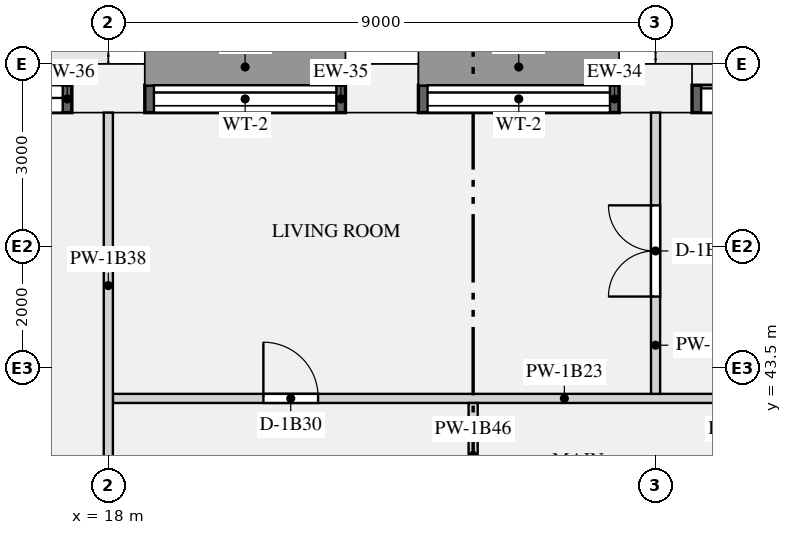
"""IFC4 building model, lengths in metres.
Left out: names, types, materials, properties, quantities, classifications, styles, units other than length and angle.
Written with IfcOpenShell. Run it as: python <this file> out.ifc"""

import sys

from ifc_helpers import new_model, si_unit, direction, frame, frame_2d, origin, origin_2d, place, context, subcontext, project, spatial, rectangle, extrude, element, fill, save


model = new_model("IFC4")
c1 = context("Model", 3, precision=1e-05, world=origin(), true_north=direction((0.0, 1.0)))
c2 = subcontext(c1, "Body", "Model", "MODEL_VIEW")
j1 = project(units=[si_unit("LENGTHUNIT", "METRE"), si_unit("PLANEANGLEUNIT", "RADIAN")], contexts=[c1])
p1 = place(None, origin())
s1 = spatial("IfcSite", under=j1, at=p1, CompositionType="ELEMENT")
p2 = place(p1, origin())
s2 = spatial("IfcBuilding", under=s1, at=p2, CompositionType="ELEMENT")
p3 = place(p2, frame((0.0, 0.0, 28.95)))
s3 = spatial("IfcBuildingStorey", under=s2, at=p3, CompositionType="ELEMENT", Elevation=28.95)
for number, where, z_axis, x_axis in (
    (1, (27.0, 48.1, 0.0), (0.0, 0.0, 1.0), (-1.0, 0.0, 0.0)),
    (2, (22.5, 48.1, 0.0), (0.0, 0.0, 1.0), (-1.0, 0.0, 0.0)),
    (3, (18.0, 48.1, 0.0), (0.0, 0.0, 1.0), (-1.0, 0.0, 0.0)),
):
    element("IfcColumn", number, at=place(p3, frame(where, z_axis=z_axis, x_axis=x_axis)), inside=s3, PredefinedType="USERDEFINED", context=c2, shape_type="SweptSolid", body=[
        extrude(rectangle(XDim=1.2, YDim=0.8, at=origin_2d()), origin(), (0.0, 0.0, 1.0), 3.15),
    ])
p4 = place(p3, frame((30.9, 47.925, 0.0), z_axis=(0.0, 0.0, 1.0), x_axis=(-1.0, 0.0, 0.0)))
e4 = element("IfcWall", 4, at=p4, inside=s3, PredefinedType="SOLIDWALL", context=c2, shape_type="SweptSolid", body=[
    extrude(rectangle(XDim=3.3, YDim=0.45, at=frame_2d((1.65, 0.0))), origin(), (0.0, 0.0, 1.0), 2.83),
])
p5 = place(p4, frame((0.15, 0.0, 0.0)))
e5 = element("IfcOpeningElement", 5, at=p5, cuts=e4, PredefinedType="OPENING", context=c2, shape_type="SweptSolid", body=[
    extrude(rectangle(XDim=3.0, YDim=2.3, at=frame_2d((1.5, 1.15))), frame((0.0, 0.235, 0.0), z_axis=(0.0, -1.0, 0.0), x_axis=(1.0, 0.0, 0.0)), (0.0, 0.0, 1.0), 0.47),
])
p6 = place(p3, frame((26.4, 47.925, 0.9), z_axis=(0.0, 0.0, 1.0), x_axis=(-1.0, 0.0, 0.0)))
e6 = element("IfcWall", 6, at=p6, inside=s3, PredefinedType="SOLIDWALL", context=c2, shape_type="SweptSolid", body=[
    extrude(rectangle(XDim=3.3, YDim=0.45, at=frame_2d((1.65, 0.0))), origin(), (0.0, 0.0, 1.0), 1.93),
])
p7 = place(p6, frame((0.15, 0.0, 0.15)))
e7 = element("IfcOpeningElement", 7, at=p7, cuts=e6, PredefinedType="OPENING", context=c2, shape_type="SweptSolid", body=[
    extrude(rectangle(XDim=3.0, YDim=1.5, at=frame_2d((1.5, 0.75))), frame((0.0, 0.235, 0.0), z_axis=(0.0, -1.0, 0.0), x_axis=(1.0, 0.0, 0.0)), (0.0, 0.0, 1.0), 0.47),
])
p8 = place(p3, frame((21.9, 47.925, 0.9), z_axis=(0.0, 0.0, 1.0), x_axis=(-1.0, 0.0, 0.0)))
e8 = element("IfcWall", 8, at=p8, inside=s3, PredefinedType="SOLIDWALL", context=c2, shape_type="SweptSolid", body=[
    extrude(rectangle(XDim=3.3, YDim=0.45, at=frame_2d((1.65, 0.0))), origin(), (0.0, 0.0, 1.0), 1.93),
])
p9 = place(p8, frame((0.15, 0.0, 0.15)))
e9 = element("IfcOpeningElement", 9, at=p9, cuts=e8, PredefinedType="OPENING", context=c2, shape_type="SweptSolid", body=[
    extrude(rectangle(XDim=3.0, YDim=1.5, at=frame_2d((1.5, 0.75))), frame((0.0, 0.235, 0.0), z_axis=(0.0, -1.0, 0.0), x_axis=(1.0, 0.0, 0.0)), (0.0, 0.0, 1.0), 0.47),
])
p10 = place(p3, frame((17.4, 47.925, 0.0), z_axis=(0.0, 0.0, 1.0), x_axis=(-1.0, 0.0, 0.0)))
e10 = element("IfcWall", 10, at=p10, inside=s3, PredefinedType="SOLIDWALL", context=c2, shape_type="SweptSolid", body=[
    extrude(rectangle(XDim=3.3, YDim=0.45, at=frame_2d((1.65, 0.0))), origin(), (0.0, 0.0, 1.0), 2.83),
])
p11 = place(p10, frame((0.15, 0.0, 0.0)))
e11 = element("IfcOpeningElement", 11, at=p11, cuts=e10, PredefinedType="OPENING", context=c2, shape_type="SweptSolid", body=[
    extrude(rectangle(XDim=3.0, YDim=2.3, at=frame_2d((1.5, 1.15))), frame((0.0, 0.235, 0.0), z_axis=(0.0, -1.0, 0.0), x_axis=(1.0, 0.0, 0.0)), (0.0, 0.0, 1.0), 0.47),
])
p12 = place(p3, frame((18.075, 43.0, 0.0), z_axis=(0.0, 0.0, 1.0), x_axis=(1.0, 0.0, 0.0)))
e12 = element("IfcWall", 12, at=p12, inside=s3, PredefinedType="PARTITIONING", context=c2, shape_type="SweptSolid", body=[
    extrude(rectangle(XDim=31.35, YDim=0.15, at=frame_2d((15.675, 0.0))), origin(), (0.0, 0.0, 1.0), 2.83),
])
p13 = place(p12, frame((17.175, 0.0, 0.0)))
e13 = element("IfcOpeningElement", 13, at=p13, cuts=e12, PredefinedType="OPENING", context=c2, shape_type="SweptSolid", body=[
    extrude(rectangle(XDim=1.5, YDim=2.1, at=frame_2d((0.75, 1.05))), frame((0.0, 0.085, 0.0), z_axis=(0.0, -1.0, 0.0), x_axis=(1.0, 0.0, 0.0)), (0.0, 0.0, 1.0), 0.17),
])
p14 = place(p12, frame((11.475, 0.0, 0.0)))
e14 = element("IfcOpeningElement", 14, at=p14, cuts=e12, PredefinedType="OPENING", context=c2, shape_type="SweptSolid", body=[
    extrude(rectangle(XDim=0.9, YDim=2.1, at=frame_2d((0.45, 1.05))), frame((0.0, 0.085, 0.0), z_axis=(0.0, -1.0, 0.0), x_axis=(1.0, 0.0, 0.0)), (0.0, 0.0, 1.0), 0.17),
])
p15 = place(p12, frame((2.475, 0.0, 0.0)))
e15 = element("IfcOpeningElement", 15, at=p15, cuts=e12, PredefinedType="OPENING", context=c2, shape_type="SweptSolid", body=[
    extrude(rectangle(XDim=0.9, YDim=2.1, at=frame_2d((0.45, 1.05))), frame((0.0, 0.085, 0.0), z_axis=(0.0, -1.0, 0.0), x_axis=(1.0, 0.0, 0.0)), (0.0, 0.0, 1.0), 0.17),
])
p16 = place(p12, frame((24.225, 0.0, 0.0)))
e16 = element("IfcOpeningElement", 16, at=p16, cuts=e12, PredefinedType="OPENING", context=c2, shape_type="SweptSolid", body=[
    extrude(rectangle(XDim=0.9, YDim=2.1, at=frame_2d((0.45, 1.05))), frame((0.0, 0.085, 0.0), z_axis=(0.0, -1.0, 0.0), x_axis=(1.0, 0.0, 0.0)), (0.0, 0.0, 1.0), 0.17),
])
p17 = place(p12, frame((28.725, 0.0, 0.0)))
e17 = element("IfcOpeningElement", 17, at=p17, cuts=e12, PredefinedType="OPENING", context=c2, shape_type="SweptSolid", body=[
    extrude(rectangle(XDim=0.9, YDim=2.1, at=frame_2d((0.45, 1.05))), frame((0.0, 0.085, 0.0), z_axis=(0.0, -1.0, 0.0), x_axis=(1.0, 0.0, 0.0)), (0.0, 0.0, 1.0), 0.17),
])
p18 = place(p3, frame((18.0, 40.2, 0.0), z_axis=(0.0, 0.0, 1.0), x_axis=(0.0, 1.0, 0.0)))
e18 = element("IfcWall", 18, at=p18, inside=s3, PredefinedType="PARTITIONING", context=c2, shape_type="SweptSolid", body=[
    extrude(rectangle(XDim=7.5, YDim=0.15, at=frame_2d((3.75, 0.0))), origin(), (0.0, 0.0, 1.0), 2.83),
])
p19 = place(p18, frame((0.912, 0.0, 0.0)))
e19 = element("IfcOpeningElement", 19, at=p19, cuts=e18, PredefinedType="OPENING", context=c2, shape_type="SweptSolid", body=[
    extrude(rectangle(XDim=0.9, YDim=2.1, at=frame_2d((0.45, 1.05))), frame((0.0, 0.085, 0.0), z_axis=(0.0, -1.0, 0.0), x_axis=(1.0, 0.0, 0.0)), (0.0, 0.0, 1.0), 0.17),
])
p20 = place(p3, frame((24.0, 38.6, 0.0), z_axis=(0.0, 0.0, 1.0), x_axis=(0.0, 1.0, 0.0)))
e20 = element("IfcWall", 20, at=p20, inside=s3, PredefinedType="PARTITIONING", context=c2, shape_type="SweptSolid", body=[
    extrude(rectangle(XDim=4.325, YDim=0.15, at=frame_2d((2.163, 0.0))), origin(), (0.0, 0.0, 1.0), 2.83),
])
p21 = place(p20, frame((1.7, 0.0, 0.0)))
e21 = element("IfcOpeningElement", 21, at=p21, cuts=e20, PredefinedType="OPENING", context=c2, shape_type="SweptSolid", body=[
    extrude(rectangle(XDim=0.9, YDim=2.1, at=frame_2d((0.45, 1.05))), frame((0.0, 0.085, 0.0), z_axis=(0.0, -1.0, 0.0), x_axis=(1.0, 0.0, 0.0)), (0.0, 0.0, 1.0), 0.17),
])
p22 = place(p3, frame((27.0, 43.075, 0.0), z_axis=(0.0, 0.0, 1.0), x_axis=(0.0, 1.0, 0.0)))
e22 = element("IfcWall", 22, at=p22, inside=s3, PredefinedType="PARTITIONING", context=c2, shape_type="SweptSolid", body=[
    extrude(rectangle(XDim=4.625, YDim=0.15, at=frame_2d((2.312, 0.0))), origin(), (0.0, 0.0, 1.0), 2.83),
])
p23 = place(p22, frame((1.6, 0.0, 0.0)))
e23 = element("IfcOpeningElement", 23, at=p23, cuts=e22, PredefinedType="OPENING", context=c2, shape_type="SweptSolid", body=[
    extrude(rectangle(XDim=1.5, YDim=2.1, at=frame_2d((0.75, 1.05))), frame((0.0, 0.085, 0.0), z_axis=(0.0, -1.0, 0.0), x_axis=(1.0, 0.0, 0.0)), (0.0, 0.0, 1.0), 0.17),
])
p24 = place(p5, origin())
e24 = element("IfcDoor", 24, at=p24, inside=s3, OperationType="SLIDING_TO_LEFT", PredefinedType="DOOR", context=c2, shape_type="SweptSolid", body=[
    extrude(rectangle(XDim=3.0, YDim=2.3, at=frame_2d((1.5, 1.15))), frame((0.0, -0.07, 0.0), z_axis=(0.0, -1.0, 0.0), x_axis=(1.0, 0.0, 0.0)), (0.0, 0.0, 1.0), 0.05),
])
fill(e5, e24)
p25 = place(p7, origin())
e25 = element("IfcWindow", 25, at=p25, inside=s3, PartitioningType="SINGLE_PANEL", PredefinedType="WINDOW", context=c2, shape_type="SweptSolid", body=[
    extrude(rectangle(XDim=3.0, YDim=1.5, at=frame_2d((1.5, 0.75))), frame((0.0, -0.065, 0.0), z_axis=(0.0, -1.0, 0.0), x_axis=(1.0, 0.0, 0.0)), (0.0, 0.0, 1.0), 0.06),
])
fill(e7, e25)
p26 = place(p9, origin())
e26 = element("IfcWindow", 26, at=p26, inside=s3, PartitioningType="SINGLE_PANEL", PredefinedType="WINDOW", context=c2, shape_type="SweptSolid", body=[
    extrude(rectangle(XDim=3.0, YDim=1.5, at=frame_2d((1.5, 0.75))), frame((0.0, -0.065, 0.0), z_axis=(0.0, -1.0, 0.0), x_axis=(1.0, 0.0, 0.0)), (0.0, 0.0, 1.0), 0.06),
])
fill(e9, e26)
p27 = place(p11, origin())
e27 = element("IfcDoor", 27, at=p27, inside=s3, OperationType="SLIDING_TO_LEFT", PredefinedType="DOOR", context=c2, shape_type="SweptSolid", body=[
    extrude(rectangle(XDim=3.0, YDim=2.3, at=frame_2d((1.5, 1.15))), frame((0.0, -0.07, 0.0), z_axis=(0.0, -1.0, 0.0), x_axis=(1.0, 0.0, 0.0)), (0.0, 0.0, 1.0), 0.05),
])
fill(e11, e27)
p28 = place(p23, origin())
e28 = element("IfcDoor", 28, at=p28, inside=s3, OperationType="DOUBLE_DOOR_SINGLE_SWING", PredefinedType="DOOR", context=c2, shape_type="SweptSolid", body=[
    extrude(rectangle(XDim=1.5, YDim=2.1, at=frame_2d((0.75, 1.05))), frame((0.0, 0.025, 0.0), z_axis=(0.0, -1.0, 0.0), x_axis=(1.0, 0.0, 0.0)), (0.0, 0.0, 1.0), 0.05),
])
fill(e23, e28)
p29 = place(p15, origin())
e29 = element("IfcDoor", 29, at=p29, inside=s3, OperationType="SINGLE_SWING_LEFT", PredefinedType="DOOR", context=c2, shape_type="SweptSolid", body=[
    extrude(rectangle(XDim=0.9, YDim=2.1, at=frame_2d((0.45, 1.05))), frame((0.0, 0.025, 0.0), z_axis=(0.0, -1.0, 0.0), x_axis=(1.0, 0.0, 0.0)), (0.0, 0.0, 1.0), 0.05),
])
fill(e15, e29)
save(model, sys.argv[1])
